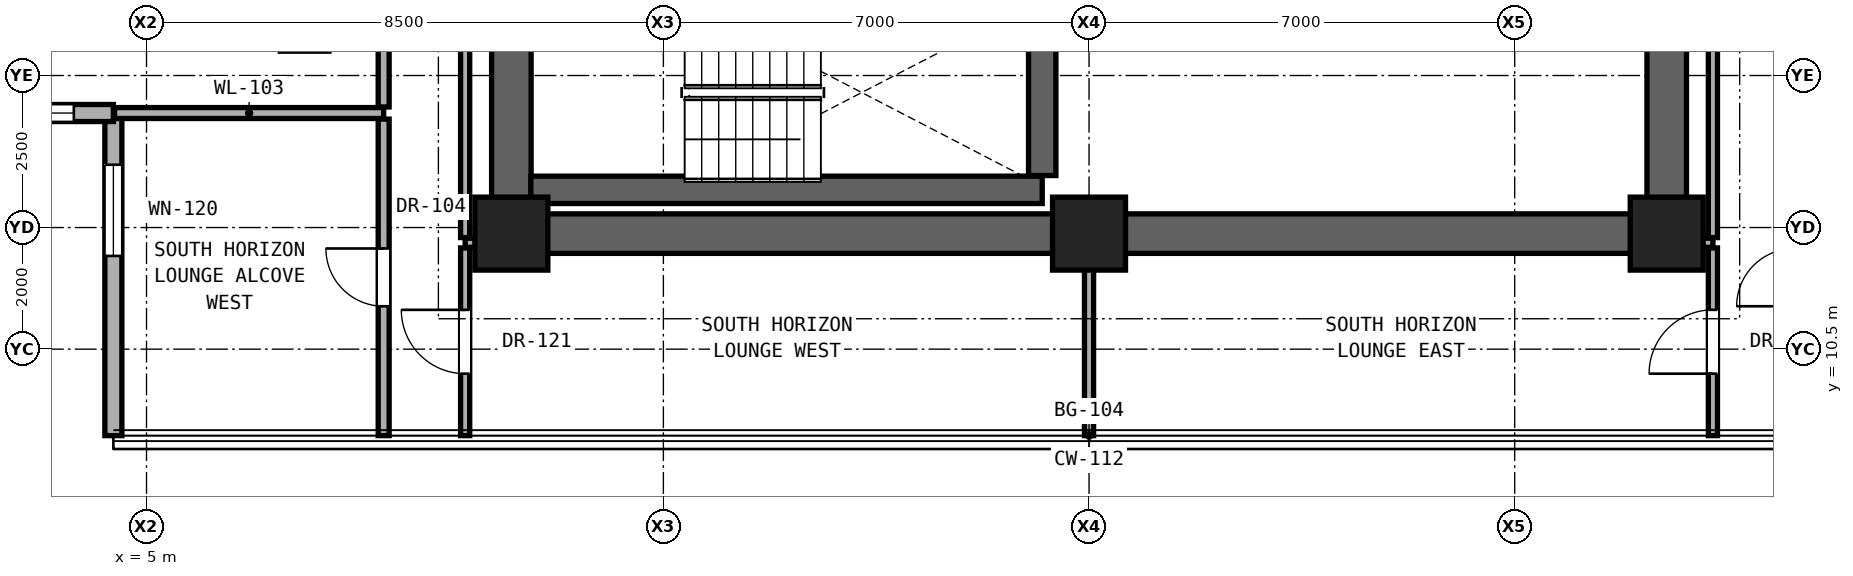
"""IFC4 building model, lengths in metres.
Left out: names, types, materials, properties, quantities, classifications, styles, units other than length and angle.
Written with IfcOpenShell. Run it as: python <this file> out.ifc"""

import sys

from ifc_helpers import new_model, si_unit, direction, frame, frame_2d, origin, origin_2d, place, context, subcontext, project, spatial, rectangle, extrude, element, fill, save


model = new_model("IFC4")
c1 = context("Model", 3, precision=1e-05, world=origin(), true_north=direction((0.0, 1.0)))
c2 = subcontext(c1, "Body", "Model", "MODEL_VIEW")
j1 = project(units=[si_unit("LENGTHUNIT", "METRE"), si_unit("PLANEANGLEUNIT", "RADIAN")], contexts=[c1])
p1 = place(None, origin())
s1 = spatial("IfcSite", under=j1, at=p1, CompositionType="ELEMENT")
p2 = place(p1, origin())
s2 = spatial("IfcBuilding", under=s1, at=p2, CompositionType="ELEMENT")
p3 = place(p2, frame((0.0, 0.0, 101.6)))
s3 = spatial("IfcBuildingStorey", under=s2, at=p3, CompositionType="ELEMENT", Elevation=101.6)
for number, where, z_axis, x_axis in (
    (1, (11.0, 12.4, 0.0), (0.0, 0.0, 1.0), (1.0, 0.0, 0.0)),
    (2, (20.5, 12.4, 0.0), (0.0, 0.0, 1.0), (1.0, 0.0, 0.0)),
    (3, (30.0, 12.4, 0.0), (0.0, 0.0, 1.0), (1.0, 0.0, 0.0)),
):
    element("IfcColumn", number, at=place(p3, frame(where, z_axis=z_axis, x_axis=x_axis)), inside=s3, PredefinedType="COLUMN", context=c2, shape_type="SweptSolid", body=[
        extrude(rectangle(XDim=1.2, YDim=1.2, at=origin_2d()), origin(), (0.0, 0.0, 1.0), 3.3),
    ])
p4 = place(p3, frame((11.0, 12.4, 0.0), z_axis=(0.0, 0.0, 1.0), x_axis=(1.0, 0.0, 0.0)))
e4 = element("IfcWall", 4, at=p4, inside=s3, PredefinedType="SHEAR", context=c2, shape_type="SweptSolid", body=[
    extrude(rectangle(XDim=19.0, YDim=0.65, at=frame_2d((9.5, 0.0))), origin(), (0.0, 0.0, 1.0), 3.08),
])
for number, where, z_axis, x_axis in (
    (5, (11.0, 12.4, 0.0), (0.0, 0.0, 1.0), (0.0, 1.0, 0.0)),
    (6, (30.0, 12.4, 0.0), (0.0, 0.0, 1.0), (0.0, 1.0, 0.0)),
):
    element("IfcWall", number, at=place(p3, frame(where, z_axis=z_axis, x_axis=x_axis)), inside=s3, PredefinedType="SHEAR", context=c2, shape_type="SweptSolid", body=[
        extrude(rectangle(XDim=6.0, YDim=0.65, at=frame_2d((3.0, 0.0))), origin(), (0.0, 0.0, 1.0), 3.08),
    ])
p5 = place(p3, frame((4.455, 14.383, 0.0), z_axis=(0.0, 0.0, 1.0), x_axis=(0.0, -1.0, 0.0)))
e7 = element("IfcWall", 7, at=p5, inside=s3, PredefinedType="SOLIDWALL", context=c2, shape_type="SweptSolid", body=[
    extrude(rectangle(XDim=5.305, YDim=0.28, at=frame_2d((2.653, 0.0))), origin(), (0.0, 0.0, 1.0), 3.06),
])
p6 = place(p5, frame((0.85, 0.0, 0.81)))
e8 = element("IfcOpeningElement", 8, at=p6, cuts=e7, PredefinedType="OPENING", context=c2, shape_type="SweptSolid", body=[
    extrude(rectangle(XDim=1.5, YDim=2.1, at=frame_2d((0.75, 1.05))), frame((0.0, 0.15, 0.0), z_axis=(0.0, -1.0, 0.0), x_axis=(1.0, 0.0, 0.0)), (0.0, 0.0, 1.0), 0.3),
])
p7 = place(p3, frame((-0.85, 14.383, 0.0), z_axis=(0.0, 0.0, 1.0), x_axis=(1.0, 0.0, 0.0)))
e9 = element("IfcWall", 9, at=p7, inside=s3, PredefinedType="SOLIDWALL", context=c2, shape_type="SweptSolid", body=[
    extrude(rectangle(XDim=5.305, YDim=0.28, at=frame_2d((2.653, 0.0))), origin(), (0.0, 0.0, 1.0), 3.06),
])
p8 = place(p7, frame((3.555, 0.0, 0.85)))
e10 = element("IfcOpeningElement", 10, at=p8, cuts=e9, PredefinedType="OPENING", context=c2, shape_type="SweptSolid", body=[
    extrude(rectangle(XDim=1.1, YDim=2.0, at=frame_2d((0.55, 1.0))), frame((0.0, 0.15, 0.0), z_axis=(0.0, -1.0, 0.0), x_axis=(1.0, 0.0, 0.0)), (0.0, 0.0, 1.0), 0.3),
])
for number, where, z_axis, x_axis in (
    (11, (10.24, 12.25, 0.0), (0.0, 0.0, 1.0), (1.0, 0.0, 0.0)),
    (12, (30.32, 12.25, 0.0), (0.0, 0.0, 1.0), (1.0, 0.0, 0.0)),
):
    element("IfcWall", number, at=place(p3, frame(where, z_axis=z_axis, x_axis=x_axis)), inside=s3, PredefinedType="PARTITIONING", context=c2, shape_type="SweptSolid", body=[
        extrude(rectangle(XDim=0.44, YDim=0.15, at=frame_2d((0.22, 0.0))), origin(), (0.0, 0.0, 1.0), 3.08),
    ])
p9 = place(p3, frame((11.32, 13.12, 0.0), z_axis=(0.0, 0.0, 1.0), x_axis=(1.0, 0.0, 0.0)))
e13 = element("IfcWall", 13, at=p9, inside=s3, PredefinedType="SHEAR", context=c2, shape_type="SweptSolid", body=[
    extrude(rectangle(XDim=8.41, YDim=0.45, at=frame_2d((4.205, 0.0))), origin(), (0.0, 0.0, 1.0), 3.08),
])
p10 = place(p3, frame((4.475, 14.383, 0.0), z_axis=(0.0, 0.0, 1.0), x_axis=(1.0, 0.0, 0.0)))
e14 = element("IfcWall", 14, at=p10, inside=s3, PredefinedType="PARTITIONING", context=c2, shape_type="SweptSolid", body=[
    extrude(rectangle(XDim=4.425, YDim=0.18, at=frame_2d((2.212, 0.0))), origin(), (0.0, 0.0, 1.0), 3.08),
])
p11 = place(p3, frame((8.9, 9.078, 0.0), z_axis=(0.0, 0.0, 1.0), x_axis=(0.0, 1.0, 0.0)))
e15 = element("IfcWall", 15, at=p11, inside=s3, PredefinedType="PARTITIONING", context=c2, shape_type="SweptSolid", body=[
    extrude(rectangle(XDim=5.205, YDim=0.18, at=frame_2d((2.603, 0.0))), origin(), (0.0, 0.0, 1.0), 3.08),
])
p12 = place(p11, frame((2.127, 0.0, 0.0)))
e16 = element("IfcOpeningElement", 16, at=p12, cuts=e15, PredefinedType="OPENING", context=c2, shape_type="SweptSolid", body=[
    extrude(rectangle(XDim=0.95, YDim=2.15, at=frame_2d((0.475, 1.075))), frame((0.0, 0.1, 0.0), z_axis=(0.0, -1.0, 0.0), x_axis=(1.0, 0.0, 0.0)), (0.0, 0.0, 1.0), 0.2),
])
p13 = place(p3, frame((8.9, 14.483, 0.0), z_axis=(0.0, 0.0, 1.0), x_axis=(0.0, 1.0, 0.0)))
e17 = element("IfcWall", 17, at=p13, inside=s3, PredefinedType="PARTITIONING", context=c2, shape_type="SweptSolid", body=[
    extrude(rectangle(XDim=4.638, YDim=0.18, at=frame_2d((2.319, 0.0))), origin(), (0.0, 0.0, 1.0), 2.456),
])
p14 = place(p13, frame((2.394, 0.0, 0.0)))
e18 = element("IfcOpeningElement", 18, at=p14, cuts=e17, PredefinedType="OPENING", context=c2, shape_type="SweptSolid", body=[
    extrude(rectangle(XDim=1.05, YDim=2.2, at=frame_2d((0.525, 1.1))), frame((0.0, 0.1, 0.0), z_axis=(0.0, -1.0, 0.0), x_axis=(1.0, 0.0, 0.0)), (0.0, 0.0, 1.0), 0.2),
])
p15 = place(p3, frame((10.24, 9.078, 0.0), z_axis=(0.0, 0.0, 1.0), x_axis=(0.0, 1.0, 0.0)))
e19 = element("IfcWall", 19, at=p15, inside=s3, PredefinedType="PARTITIONING", context=c2, shape_type="SweptSolid", body=[
    extrude(rectangle(XDim=3.087, YDim=0.15, at=frame_2d((1.543, 0.0))), origin(), (0.0, 0.0, 1.0), 3.08),
])
p16 = place(p15, frame((1.019, 0.0, 0.0)))
e20 = element("IfcOpeningElement", 20, at=p16, cuts=e19, PredefinedType="OPENING", context=c2, shape_type="SweptSolid", body=[
    extrude(rectangle(XDim=1.05, YDim=2.2, at=frame_2d((0.525, 1.1))), frame((0.0, 0.085, 0.0), z_axis=(0.0, -1.0, 0.0), x_axis=(1.0, 0.0, 0.0)), (0.0, 0.0, 1.0), 0.17),
])
p17 = place(p3, frame((10.24, 12.335, 0.0), z_axis=(0.0, 0.0, 1.0), x_axis=(0.0, 1.0, 0.0)))
e21 = element("IfcWall", 21, at=p17, inside=s3, PredefinedType="PARTITIONING", context=c2, shape_type="SweptSolid", body=[
    extrude(rectangle(XDim=5.98, YDim=0.15, at=frame_2d((2.99, 0.0))), origin(), (0.0, 0.0, 1.0), 2.456),
])
p18 = place(p3, frame((19.73, 13.355, 0.0), z_axis=(0.0, 0.0, 1.0), x_axis=(0.0, 1.0, 0.0)))
e22 = element("IfcWall", 22, at=p18, inside=s3, PredefinedType="SHEAR", context=c2, shape_type="SweptSolid", body=[
    extrude(rectangle(XDim=2.73, YDim=0.45, at=frame_2d((1.365, 0.0))), origin(), (0.0, 0.0, 1.0), 3.08),
])
p19 = place(p3, frame((20.5, 9.078, 0.0), z_axis=(0.0, 0.0, 1.0), x_axis=(0.0, 1.0, 0.0)))
e23 = element("IfcWall", 23, at=p19, inside=s3, PredefinedType="PARTITIONING", context=c2, shape_type="SweptSolid", body=[
    extrude(rectangle(XDim=3.002, YDim=0.15, at=frame_2d((1.501, 0.0))), origin(), (0.0, 0.0, 1.0), 3.08),
])
p20 = place(p3, frame((30.76, 9.078, 0.0), z_axis=(0.0, 0.0, 1.0), x_axis=(0.0, 1.0, 0.0)))
e24 = element("IfcWall", 24, at=p20, inside=s3, PredefinedType="PARTITIONING", context=c2, shape_type="SweptSolid", body=[
    extrude(rectangle(XDim=3.087, YDim=0.15, at=frame_2d((1.543, 0.0))), origin(), (0.0, 0.0, 1.0), 3.08),
])
p21 = place(p20, frame((1.019, 0.0, 0.0)))
e25 = element("IfcOpeningElement", 25, at=p21, cuts=e24, PredefinedType="OPENING", context=c2, shape_type="SweptSolid", body=[
    extrude(rectangle(XDim=1.05, YDim=2.2, at=frame_2d((0.525, 1.1))), frame((0.0, 0.085, 0.0), z_axis=(0.0, -1.0, 0.0), x_axis=(1.0, 0.0, 0.0)), (0.0, 0.0, 1.0), 0.17),
])
p22 = place(p3, frame((30.76, 12.335, 0.0), z_axis=(0.0, 0.0, 1.0), x_axis=(0.0, 1.0, 0.0)))
e26 = element("IfcWall", 26, at=p22, inside=s3, PredefinedType="PARTITIONING", context=c2, shape_type="SweptSolid", body=[
    extrude(rectangle(XDim=5.98, YDim=0.15, at=frame_2d((2.99, 0.0))), origin(), (0.0, 0.0, 1.0), 2.456),
])
p23 = place(p6, origin())
e27 = element("IfcWindow", 27, at=p23, inside=s3, PartitioningType="SINGLE_PANEL", PredefinedType="WINDOW", context=c2, shape_type="SweptSolid", body=[
    extrude(rectangle(XDim=1.5, YDim=2.1, at=frame_2d((0.75, 1.05))), frame((0.0, 0.03, 0.0), z_axis=(0.0, -1.0, 0.0), x_axis=(1.0, 0.0, 0.0)), (0.0, 0.0, 1.0), 0.06),
])
fill(e8, e27)
p24 = place(p8, origin())
e28 = element("IfcWindow", 28, at=p24, inside=s3, PartitioningType="SINGLE_PANEL", PredefinedType="WINDOW", context=c2, shape_type="SweptSolid", body=[
    extrude(rectangle(XDim=1.1, YDim=2.0, at=frame_2d((0.55, 1.0))), frame((0.0, 0.03, 0.0), z_axis=(0.0, -1.0, 0.0), x_axis=(1.0, 0.0, 0.0)), (0.0, 0.0, 1.0), 0.06),
])
fill(e10, e28)
p25 = place(p16, origin())
e29 = element("IfcDoor", 29, at=p25, inside=s3, OperationType="SINGLE_SWING_RIGHT", PredefinedType="DOOR", context=c2, shape_type="SweptSolid", body=[
    extrude(rectangle(XDim=1.05, YDim=2.2, at=frame_2d((0.525, 1.1))), frame((0.0, 0.025, 0.0), z_axis=(0.0, -1.0, 0.0), x_axis=(1.0, 0.0, 0.0)), (0.0, 0.0, 1.0), 0.05),
])
fill(e20, e29)
p26 = place(p21, origin())
e30 = element("IfcDoor", 30, at=p26, inside=s3, OperationType="SINGLE_SWING_LEFT", PredefinedType="DOOR", context=c2, shape_type="SweptSolid", body=[
    extrude(rectangle(XDim=1.05, YDim=2.2, at=frame_2d((0.525, 1.1))), frame((0.0, 0.025, 0.0), z_axis=(0.0, -1.0, 0.0), x_axis=(1.0, 0.0, 0.0)), (0.0, 0.0, 1.0), 0.05),
])
fill(e25, e30)
p27 = place(p12, origin())
e31 = element("IfcDoor", 31, at=p27, inside=s3, OperationType="SINGLE_SWING_RIGHT", PredefinedType="DOOR", context=c2, shape_type="SweptSolid", body=[
    extrude(rectangle(XDim=0.95, YDim=2.15, at=frame_2d((0.475, 1.075))), frame((0.0, 0.025, 0.0), z_axis=(0.0, -1.0, 0.0), x_axis=(1.0, 0.0, 0.0)), (0.0, 0.0, 1.0), 0.05),
])
fill(e16, e31)
save(model, sys.argv[1])
